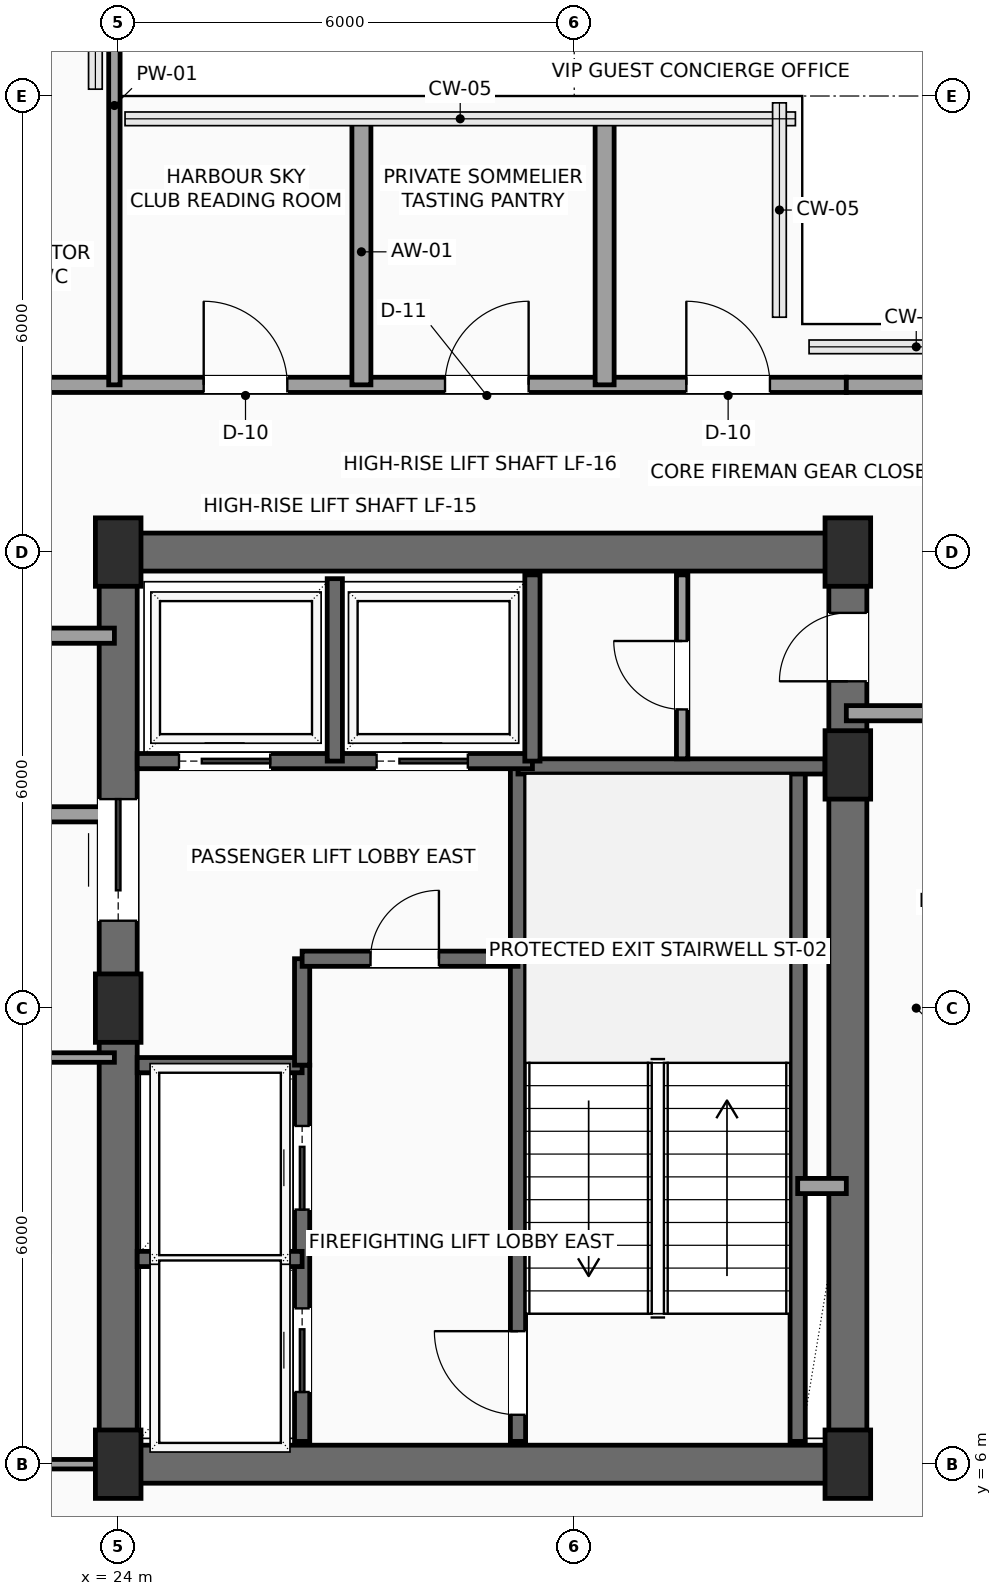
"""IFC4 building model, lengths in metres.
Left out: names, types, materials, properties, quantities, classifications, styles, units other than length and angle.
Written with IfcOpenShell. Run it as: python <this file> out.ifc"""

import sys

from ifc_helpers import new_model, si_unit, direction, frame, frame_2d, origin, origin_2d, place, context, subcontext, project, spatial, rectangle, extrude, element, fill, save


model = new_model("IFC4")
c1 = context("Model", 3, precision=1e-05, world=origin(), true_north=direction((0.0, 1.0)))
c2 = subcontext(c1, "Body", "Model", "MODEL_VIEW")
j1 = project(units=[si_unit("LENGTHUNIT", "METRE"), si_unit("PLANEANGLEUNIT", "RADIAN")], contexts=[c1])
p1 = place(None, origin())
s1 = spatial("IfcSite", under=j1, at=p1, CompositionType="ELEMENT")
p2 = place(p1, origin())
s2 = spatial("IfcBuilding", under=s1, at=p2, CompositionType="ELEMENT")
p3 = place(p2, frame((0.0, 0.0, 239.7)))
s3 = spatial("IfcBuildingStorey", under=s2, at=p3, CompositionType="ELEMENT", Elevation=239.7)
for number, where, z_axis, x_axis in (
    (1, (24.0, 6.0, 0.0), (0.0, 0.0, 1.0), (1.0, 0.0, 0.0)),
    (2, (24.0, 12.0, 0.0), (0.0, 0.0, 1.0), (1.0, 0.0, 0.0)),
    (3, (24.0, 18.0, 0.0), (0.0, 0.0, 1.0), (1.0, 0.0, 0.0)),
    (4, (33.6, 6.0, 0.0), (0.0, 0.0, 1.0), (1.0, 0.0, 0.0)),
    (5, (33.6, 15.2, 0.0), (0.0, 0.0, 1.0), (1.0, 0.0, 0.0)),
    (6, (33.6, 18.0, 0.0), (0.0, 0.0, 1.0), (1.0, 0.0, 0.0)),
):
    element("IfcColumn", number, at=place(p3, frame(where, z_axis=z_axis, x_axis=x_axis)), inside=s3, PredefinedType="COLUMN", context=c2, shape_type="SweptSolid", body=[
        extrude(rectangle(XDim=0.6, YDim=0.9, at=origin_2d()), origin(), (0.0, 0.0, 1.0), 3.5),
    ])
for number, where, z_axis, x_axis in (
    (7, (24.0, 6.0, 0.0), (0.0, 0.0, 1.0), (1.0, 0.0, 0.0)),
    (8, (24.0, 18.0, 0.0), (0.0, 0.0, 1.0), (1.0, 0.0, 0.0)),
):
    element("IfcWall", number, at=place(p3, frame(where, z_axis=z_axis, x_axis=x_axis)), inside=s3, PredefinedType="SHEAR", context=c2, shape_type="SweptSolid", body=[
        extrude(rectangle(XDim=9.6, YDim=0.5, at=frame_2d((4.8, 0.0))), origin(), (0.0, 0.0, 1.0), 3.3),
    ])
p4 = place(p3, frame((24.0, 6.0, 0.0), z_axis=(0.0, 0.0, 1.0), x_axis=(0.0, 1.0, 0.0)))
e9 = element("IfcWall", 9, at=p4, inside=s3, PredefinedType="SHEAR", context=c2, shape_type="SweptSolid", body=[
    extrude(rectangle(XDim=12.0, YDim=0.5, at=frame_2d((6.0, 0.0))), origin(), (0.0, 0.0, 1.0), 3.3),
])
p5 = place(p4, frame((7.15, 0.0, 0.0)))
e10 = element("IfcOpeningElement", 10, at=p5, cuts=e9, PredefinedType="OPENING", context=c2, shape_type="SweptSolid", body=[
    extrude(rectangle(XDim=1.6, YDim=2.3, at=frame_2d((0.8, 1.15))), frame((0.0, 0.26, 0.0), z_axis=(0.0, -1.0, 0.0), x_axis=(1.0, 0.0, 0.0)), (0.0, 0.0, 1.0), 0.52),
])
p6 = place(p3, frame((33.6, 6.0, 0.0), z_axis=(0.0, 0.0, 1.0), x_axis=(0.0, 1.0, 0.0)))
e11 = element("IfcWall", 11, at=p6, inside=s3, PredefinedType="SHEAR", context=c2, shape_type="SweptSolid", body=[
    extrude(rectangle(XDim=12.0, YDim=0.5, at=frame_2d((6.0, 0.0))), origin(), (0.0, 0.0, 1.0), 3.3),
])
p7 = place(p6, frame((10.3, 0.0, 0.0)))
e12 = element("IfcOpeningElement", 12, at=p7, cuts=e11, PredefinedType="OPENING", context=c2, shape_type="SweptSolid", body=[
    extrude(rectangle(XDim=0.9, YDim=2.15, at=frame_2d((0.45, 1.075))), frame((0.0, 0.26, 0.0), z_axis=(0.0, -1.0, 0.0), x_axis=(1.0, 0.0, 0.0)), (0.0, 0.0, 1.0), 0.52),
])
p8 = place(p3, frame((29.26, 6.3, 0.0), z_axis=(0.0, 0.0, 1.0), x_axis=(0.0, 1.0, 0.0)))
e13 = element("IfcWall", 13, at=p8, inside=s3, PredefinedType="SHEAR", context=c2, shape_type="SweptSolid", body=[
    extrude(rectangle(XDim=8.88, YDim=0.2, at=frame_2d((4.44, 0.0))), origin(), (0.0, 0.0, 1.0), 3.3),
])
p9 = place(p8, frame((0.35, 0.0, 0.0)))
e14 = element("IfcOpeningElement", 14, at=p9, cuts=e13, PredefinedType="OPENING", context=c2, shape_type="SweptSolid", body=[
    extrude(rectangle(XDim=1.1, YDim=2.2, at=frame_2d((0.55, 1.1))), frame((0.0, 0.11, 0.0), z_axis=(0.0, -1.0, 0.0), x_axis=(1.0, 0.0, 0.0)), (0.0, 0.0, 1.0), 0.22),
])
p10 = place(p3, frame((32.94, 6.3, 0.0), z_axis=(0.0, 0.0, 1.0), x_axis=(0.0, 1.0, 0.0)))
e15 = element("IfcWall", 15, at=p10, inside=s3, PredefinedType="SHEAR", context=c2, shape_type="SweptSolid", body=[
    extrude(rectangle(XDim=8.88, YDim=0.2, at=frame_2d((4.44, 0.0))), origin(), (0.0, 0.0, 1.0), 3.3),
])
p11 = place(p3, frame((29.26, 15.18, 0.0), z_axis=(0.0, 0.0, 1.0), x_axis=(1.0, 0.0, 0.0)))
e16 = element("IfcWall", 16, at=p11, inside=s3, PredefinedType="SHEAR", context=c2, shape_type="SweptSolid", body=[
    extrude(rectangle(XDim=4.04, YDim=0.2, at=frame_2d((2.02, 0.0))), origin(), (0.0, 0.0, 1.0), 3.3),
])
p12 = place(p3, frame((26.42, 6.3, 0.0), z_axis=(0.0, 0.0, 1.0), x_axis=(0.0, 1.0, 0.0)))
e17 = element("IfcWall", 17, at=p12, inside=s3, PredefinedType="SHEAR", context=c2, shape_type="SweptSolid", body=[
    extrude(rectangle(XDim=4.95, YDim=0.2, at=frame_2d((2.475, 0.0))), origin(), (0.0, 0.0, 1.0), 3.3),
])
p13 = place(p12, frame((0.65, 0.0, 0.0)))
e18 = element("IfcOpeningElement", 18, at=p13, cuts=e17, PredefinedType="OPENING", context=c2, shape_type="SweptSolid", body=[
    extrude(rectangle(XDim=1.1, YDim=2.2, at=frame_2d((0.55, 1.1))), frame((0.0, 0.11, 0.0), z_axis=(0.0, -1.0, 0.0), x_axis=(1.0, 0.0, 0.0)), (0.0, 0.0, 1.0), 0.22),
])
p14 = place(p12, frame((3.05, 0.0, 0.0)))
e19 = element("IfcOpeningElement", 19, at=p14, cuts=e17, PredefinedType="OPENING", context=c2, shape_type="SweptSolid", body=[
    extrude(rectangle(XDim=1.1, YDim=2.2, at=frame_2d((0.55, 1.1))), frame((0.0, 0.11, 0.0), z_axis=(0.0, -1.0, 0.0), x_axis=(1.0, 0.0, 0.0)), (0.0, 0.0, 1.0), 0.22),
])
for number, where, z_axis, x_axis in (
    (20, (24.25, 8.7, 0.0), (0.0, 0.0, 1.0), (1.0, 0.0, 0.0)),
    (21, (24.25, 11.25, 0.0), (0.0, 0.0, 1.0), (1.0, 0.0, 0.0)),
):
    element("IfcWall", number, at=place(p3, frame(where, z_axis=z_axis, x_axis=x_axis)), inside=s3, PredefinedType="SHEAR", context=c2, shape_type="SweptSolid", body=[
        extrude(rectangle(XDim=2.17, YDim=0.2, at=frame_2d((1.085, 0.0))), origin(), (0.0, 0.0, 1.0), 3.3),
    ])
p15 = place(p3, frame((26.42, 11.25, 0.0), z_axis=(0.0, 0.0, 1.0), x_axis=(0.0, 1.0, 0.0)))
e22 = element("IfcWall", 22, at=p15, inside=s3, PredefinedType="SHEAR", context=c2, shape_type="SweptSolid", body=[
    extrude(rectangle(XDim=1.4, YDim=0.2, at=frame_2d((0.7, 0.0))), origin(), (0.0, 0.0, 1.0), 3.3),
])
p16 = place(p3, frame((26.42, 12.65, 0.0), z_axis=(0.0, 0.0, 1.0), x_axis=(1.0, 0.0, 0.0)))
e23 = element("IfcWall", 23, at=p16, inside=s3, PredefinedType="SHEAR", context=c2, shape_type="SweptSolid", body=[
    extrude(rectangle(XDim=2.84, YDim=0.2, at=frame_2d((1.42, 0.0))), origin(), (0.0, 0.0, 1.0), 3.3),
])
p17 = place(p16, frame((0.9, 0.0, 0.0)))
e24 = element("IfcOpeningElement", 24, at=p17, cuts=e23, PredefinedType="OPENING", context=c2, shape_type="SweptSolid", body=[
    extrude(rectangle(XDim=0.9, YDim=2.15, at=frame_2d((0.45, 1.075))), frame((0.0, 0.11, 0.0), z_axis=(0.0, -1.0, 0.0), x_axis=(1.0, 0.0, 0.0)), (0.0, 0.0, 1.0), 0.22),
])
p18 = place(p3, frame((32.94, 9.66, 0.0), z_axis=(0.0, 0.0, 1.0), x_axis=(1.0, 0.0, 0.0)))
e25 = element("IfcWall", 25, at=p18, inside=s3, PredefinedType="SOLIDWALL", context=c2, shape_type="SweptSolid", body=[
    extrude(rectangle(XDim=0.64, YDim=0.2, at=frame_2d((0.32, 0.0))), origin(), (0.0, 0.0, 1.0), 3.3),
])
p19 = place(p3, frame((24.25, 15.25, 0.0), z_axis=(0.0, 0.0, 1.0), x_axis=(1.0, 0.0, 0.0)))
e26 = element("IfcWall", 26, at=p19, inside=s3, PredefinedType="SHEAR", context=c2, shape_type="SweptSolid", body=[
    extrude(rectangle(XDim=5.2, YDim=0.2, at=frame_2d((2.6, 0.0))), origin(), (0.0, 0.0, 1.0), 3.3),
])
p20 = place(p19, frame((0.55, 0.0, 0.0)))
e27 = element("IfcOpeningElement", 27, at=p20, cuts=e26, PredefinedType="OPENING", context=c2, shape_type="SweptSolid", body=[
    extrude(rectangle(XDim=1.2, YDim=2.2, at=frame_2d((0.6, 1.1))), frame((0.0, 0.11, 0.0), z_axis=(0.0, -1.0, 0.0), x_axis=(1.0, 0.0, 0.0)), (0.0, 0.0, 1.0), 0.22),
])
p21 = place(p19, frame((3.15, 0.0, 0.0)))
e28 = element("IfcOpeningElement", 28, at=p21, cuts=e26, PredefinedType="OPENING", context=c2, shape_type="SweptSolid", body=[
    extrude(rectangle(XDim=1.2, YDim=2.2, at=frame_2d((0.6, 1.1))), frame((0.0, 0.11, 0.0), z_axis=(0.0, -1.0, 0.0), x_axis=(1.0, 0.0, 0.0)), (0.0, 0.0, 1.0), 0.22),
])
p22 = place(p3, frame((26.85, 15.25, 0.0), z_axis=(0.0, 0.0, 1.0), x_axis=(0.0, 1.0, 0.0)))
e29 = element("IfcWall", 29, at=p22, inside=s3, PredefinedType="SHEAR", context=c2, shape_type="SweptSolid", body=[
    extrude(rectangle(XDim=2.4, YDim=0.2, at=frame_2d((1.2, 0.0))), origin(), (0.0, 0.0, 1.0), 3.3),
])
p23 = place(p3, frame((29.45, 15.25, 0.0), z_axis=(0.0, 0.0, 1.0), x_axis=(0.0, 1.0, 0.0)))
e30 = element("IfcWall", 30, at=p23, inside=s3, PredefinedType="SHEAR", context=c2, shape_type="SweptSolid", body=[
    extrude(rectangle(XDim=2.45, YDim=0.2, at=frame_2d((1.225, 0.0))), origin(), (0.0, 0.0, 1.0), 3.3),
])
p24 = place(p3, frame((31.42, 15.28, 0.0), z_axis=(0.0, 0.0, 1.0), x_axis=(0.0, 1.0, 0.0)))
e31 = element("IfcWall", 31, at=p24, inside=s3, PredefinedType="PARTITIONING", context=c2, shape_type="SweptSolid", body=[
    extrude(rectangle(XDim=2.42, YDim=0.15, at=frame_2d((1.21, 0.0))), origin(), (0.0, 0.0, 1.0), 3.3),
])
p25 = place(p24, frame((0.65, 0.0, 0.0)))
e32 = element("IfcOpeningElement", 32, at=p25, cuts=e31, PredefinedType="OPENING", context=c2, shape_type="SweptSolid", body=[
    extrude(rectangle(XDim=0.9, YDim=2.15, at=frame_2d((0.45, 1.075))), frame((0.0, 0.085, 0.0), z_axis=(0.0, -1.0, 0.0), x_axis=(1.0, 0.0, 0.0)), (0.0, 0.0, 1.0), 0.17),
])
p26 = place(p3, frame((20.45, 20.2, 0.0), z_axis=(0.0, 0.0, 1.0), x_axis=(1.0, 0.0, 0.0)))
e33 = element("IfcWall", 33, at=p26, inside=s3, PredefinedType="PARTITIONING", context=c2, shape_type="SweptSolid", body=[
    extrude(rectangle(XDim=13.13, YDim=0.2, at=frame_2d((6.565, 0.0))), origin(), (0.0, 0.0, 1.0), 3.3),
])
p27 = place(p26, frame((4.675, 0.0, 0.0)))
e34 = element("IfcOpeningElement", 34, at=p27, cuts=e33, PredefinedType="OPENING", context=c2, shape_type="SweptSolid", body=[
    extrude(rectangle(XDim=1.1, YDim=2.25, at=frame_2d((0.55, 1.125))), frame((0.0, 0.11, 0.0), z_axis=(0.0, -1.0, 0.0), x_axis=(1.0, 0.0, 0.0)), (0.0, 0.0, 1.0), 0.22),
])
p28 = place(p26, frame((7.85, 0.0, 0.0)))
e35 = element("IfcOpeningElement", 35, at=p28, cuts=e33, PredefinedType="OPENING", context=c2, shape_type="SweptSolid", body=[
    extrude(rectangle(XDim=1.1, YDim=2.25, at=frame_2d((0.55, 1.125))), frame((0.0, 0.11, 0.0), z_axis=(0.0, -1.0, 0.0), x_axis=(1.0, 0.0, 0.0)), (0.0, 0.0, 1.0), 0.22),
])
p29 = place(p26, frame((11.025, 0.0, 0.0)))
e36 = element("IfcOpeningElement", 36, at=p29, cuts=e33, PredefinedType="OPENING", context=c2, shape_type="SweptSolid", body=[
    extrude(rectangle(XDim=1.1, YDim=2.25, at=frame_2d((0.55, 1.125))), frame((0.0, 0.11, 0.0), z_axis=(0.0, -1.0, 0.0), x_axis=(1.0, 0.0, 0.0)), (0.0, 0.0, 1.0), 0.22),
])
for number, where, z_axis, x_axis in (
    (37, (33.58, 20.2, 0.0), (0.0, 0.0, 1.0), (1.0, 0.0, 0.0)),
    (38, (35.7, 15.88, 0.0), (0.0, 0.0, 1.0), (-1.0, 0.0, 0.0)),
):
    element("IfcWall", number, at=place(p3, frame(where, z_axis=z_axis, x_axis=x_axis)), inside=s3, PredefinedType="PARTITIONING", context=c2, shape_type="SweptSolid", body=[
        extrude(rectangle(XDim=2.12, YDim=0.2, at=frame_2d((1.06, 0.0))), origin(), (0.0, 0.0, 1.0), 3.3),
    ])
p30 = place(p3, frame((20.45, 16.9, 0.0), z_axis=(0.0, 0.0, 1.0), x_axis=(1.0, 0.0, 0.0)))
e39 = element("IfcWall", 39, at=p30, inside=s3, PredefinedType="PARTITIONING", context=c2, shape_type="SweptSolid", body=[
    extrude(rectangle(XDim=3.5, YDim=0.2, at=frame_2d((1.75, 0.0))), origin(), (0.0, 0.0, 1.0), 3.3),
])
p31 = place(p3, frame((23.95, 14.55, 0.0), z_axis=(0.0, 0.0, 1.0), x_axis=(-1.0, 0.0, 0.0)))
e40 = element("IfcWall", 40, at=p31, inside=s3, PredefinedType="PARTITIONING", context=c2, shape_type="SweptSolid", body=[
    extrude(rectangle(XDim=9.0, YDim=0.2, at=frame_2d((4.5, 0.0))), origin(), (0.0, 0.0, 1.0), 3.3),
])
p32 = place(p31, frame((6.925, 0.0, 0.0)))
e41 = element("IfcOpeningElement", 41, at=p32, cuts=e40, PredefinedType="OPENING", context=c2, shape_type="SweptSolid", body=[
    extrude(rectangle(XDim=1.0, YDim=2.2, at=frame_2d((0.5, 1.1))), frame((0.0, 0.11, 0.0), z_axis=(0.0, -1.0, 0.0), x_axis=(1.0, 0.0, 0.0)), (0.0, 0.0, 1.0), 0.22),
])
p33 = place(p3, frame((23.95, 20.2, 0.0), z_axis=(0.0, 0.0, 1.0), x_axis=(0.0, 1.0, 0.0)))
e42 = element("IfcWall", 42, at=p33, inside=s3, PredefinedType="PARTITIONING", context=c2, shape_type="SweptSolid", body=[
    extrude(rectangle(XDim=7.35, YDim=0.15, at=frame_2d((3.675, 0.0))), origin(), (0.0, 0.0, 1.0), 3.3),
])
for number, where, z_axis, x_axis in (
    (43, (27.2, 20.2, 0.0), (0.0, 0.0, 1.0), (0.0, 1.0, 0.0)),
    (44, (30.4, 20.2, 0.0), (0.0, 0.0, 1.0), (0.0, 1.0, 0.0)),
):
    element("IfcWall", number, at=place(p3, frame(where, z_axis=z_axis, x_axis=x_axis)), inside=s3, PredefinedType="PARTITIONING", context=c2, shape_type="SweptSolid", body=[
        extrude(rectangle(XDim=3.5, YDim=0.25, at=frame_2d((1.75, 0.0))), origin(), (0.0, 0.0, 1.0), 3.3),
    ])
p34 = place(p3, frame((18.0, 6.0, 0.0), z_axis=(0.0, 0.0, 1.0), x_axis=(1.0, 0.0, 0.0)))
e45 = element("IfcWall", 45, at=p34, inside=s3, PredefinedType="PARTITIONING", context=c2, shape_type="SweptSolid", body=[
    extrude(rectangle(XDim=5.95, YDim=0.125, at=frame_2d((2.975, 0.0))), origin(), (0.0, 0.0, 1.0), 2.992),
])
p35 = place(p3, frame((18.0, 11.35, 0.0), z_axis=(0.0, 0.0, 1.0), x_axis=(1.0, 0.0, 0.0)))
e46 = element("IfcWall", 46, at=p35, inside=s3, PredefinedType="PARTITIONING", context=c2, shape_type="SweptSolid", body=[
    extrude(rectangle(XDim=5.95, YDim=0.125, at=frame_2d((2.975, 0.0))), origin(), (0.0, 0.0, 1.0), 3.3),
])
p36 = place(p5, origin())
e47 = element("IfcDoor", 47, at=p36, inside=s3, OperationType="DOUBLE_DOOR_SLIDING", PredefinedType="DOOR", context=c2, shape_type="SweptSolid", body=[
    extrude(rectangle(XDim=1.6, YDim=2.3, at=frame_2d((0.8, 1.15))), frame((0.0, 0.025, 0.0), z_axis=(0.0, -1.0, 0.0), x_axis=(1.0, 0.0, 0.0)), (0.0, 0.0, 1.0), 0.05),
])
fill(e10, e47)
p37 = place(p7, origin())
e48 = element("IfcDoor", 48, at=p37, inside=s3, OperationType="SINGLE_SWING_LEFT", PredefinedType="DOOR", context=c2, shape_type="SweptSolid", body=[
    extrude(rectangle(XDim=0.9, YDim=2.15, at=frame_2d((0.45, 1.075))), frame((0.0, 0.025, 0.0), z_axis=(0.0, -1.0, 0.0), x_axis=(1.0, 0.0, 0.0)), (0.0, 0.0, 1.0), 0.05),
])
fill(e12, e48)
p38 = place(p9, origin())
e49 = element("IfcDoor", 49, at=p38, inside=s3, OperationType="SINGLE_SWING_RIGHT", PredefinedType="DOOR", context=c2, shape_type="SweptSolid", body=[
    extrude(rectangle(XDim=1.1, YDim=2.2, at=frame_2d((0.55, 1.1))), frame((0.0, 0.025, 0.0), z_axis=(0.0, -1.0, 0.0), x_axis=(1.0, 0.0, 0.0)), (0.0, 0.0, 1.0), 0.05),
])
fill(e14, e49)
p39 = place(p13, origin())
e50 = element("IfcDoor", 50, at=p39, inside=s3, OperationType="SLIDING_TO_LEFT", PredefinedType="DOOR", context=c2, shape_type="SweptSolid", body=[
    extrude(rectangle(XDim=1.1, YDim=2.2, at=frame_2d((0.55, 1.1))), frame((0.0, 0.025, 0.0), z_axis=(0.0, -1.0, 0.0), x_axis=(1.0, 0.0, 0.0)), (0.0, 0.0, 1.0), 0.05),
])
fill(e18, e50)
p40 = place(p14, origin())
e51 = element("IfcDoor", 51, at=p40, inside=s3, OperationType="SLIDING_TO_LEFT", PredefinedType="DOOR", context=c2, shape_type="SweptSolid", body=[
    extrude(rectangle(XDim=1.1, YDim=2.2, at=frame_2d((0.55, 1.1))), frame((0.0, 0.025, 0.0), z_axis=(0.0, -1.0, 0.0), x_axis=(1.0, 0.0, 0.0)), (0.0, 0.0, 1.0), 0.05),
])
fill(e19, e51)
p41 = place(p17, origin())
e52 = element("IfcDoor", 52, at=p41, inside=s3, OperationType="SINGLE_SWING_RIGHT", PredefinedType="DOOR", context=c2, shape_type="SweptSolid", body=[
    extrude(rectangle(XDim=0.9, YDim=2.15, at=frame_2d((0.45, 1.075))), frame((0.0, 0.025, 0.0), z_axis=(0.0, -1.0, 0.0), x_axis=(1.0, 0.0, 0.0)), (0.0, 0.0, 1.0), 0.05),
])
fill(e24, e52)
p42 = place(p20, origin())
e53 = element("IfcDoor", 53, at=p42, inside=s3, OperationType="SLIDING_TO_RIGHT", PredefinedType="DOOR", context=c2, shape_type="SweptSolid", body=[
    extrude(rectangle(XDim=1.2, YDim=2.2, at=frame_2d((0.6, 1.1))), frame((0.0, 0.025, 0.0), z_axis=(0.0, -1.0, 0.0), x_axis=(1.0, 0.0, 0.0)), (0.0, 0.0, 1.0), 0.05),
])
fill(e27, e53)
p43 = place(p21, origin())
e54 = element("IfcDoor", 54, at=p43, inside=s3, OperationType="SLIDING_TO_RIGHT", PredefinedType="DOOR", context=c2, shape_type="SweptSolid", body=[
    extrude(rectangle(XDim=1.2, YDim=2.2, at=frame_2d((0.6, 1.1))), frame((0.0, 0.025, 0.0), z_axis=(0.0, -1.0, 0.0), x_axis=(1.0, 0.0, 0.0)), (0.0, 0.0, 1.0), 0.05),
])
fill(e28, e54)
p44 = place(p25, origin())
e55 = element("IfcDoor", 55, at=p44, inside=s3, OperationType="SINGLE_SWING_RIGHT", PredefinedType="DOOR", context=c2, shape_type="SweptSolid", body=[
    extrude(rectangle(XDim=0.9, YDim=2.15, at=frame_2d((0.45, 1.075))), frame((0.0, 0.025, 0.0), z_axis=(0.0, -1.0, 0.0), x_axis=(1.0, 0.0, 0.0)), (0.0, 0.0, 1.0), 0.05),
])
fill(e32, e55)
p45 = place(p27, origin())
e56 = element("IfcDoor", 56, at=p45, inside=s3, OperationType="SINGLE_SWING_LEFT", PredefinedType="DOOR", context=c2, shape_type="SweptSolid", body=[
    extrude(rectangle(XDim=1.1, YDim=2.25, at=frame_2d((0.55, 1.125))), frame((0.0, 0.025, 0.0), z_axis=(0.0, -1.0, 0.0), x_axis=(1.0, 0.0, 0.0)), (0.0, 0.0, 1.0), 0.05),
])
fill(e34, e56)
p46 = place(p28, origin())
e57 = element("IfcDoor", 57, at=p46, inside=s3, OperationType="SINGLE_SWING_RIGHT", PredefinedType="DOOR", context=c2, shape_type="SweptSolid", body=[
    extrude(rectangle(XDim=1.1, YDim=2.25, at=frame_2d((0.55, 1.125))), frame((0.0, 0.025, 0.0), z_axis=(0.0, -1.0, 0.0), x_axis=(1.0, 0.0, 0.0)), (0.0, 0.0, 1.0), 0.05),
])
fill(e35, e57)
p47 = place(p29, origin())
e58 = element("IfcDoor", 58, at=p47, inside=s3, OperationType="SINGLE_SWING_LEFT", PredefinedType="DOOR", context=c2, shape_type="SweptSolid", body=[
    extrude(rectangle(XDim=1.1, YDim=2.25, at=frame_2d((0.55, 1.125))), frame((0.0, 0.025, 0.0), z_axis=(0.0, -1.0, 0.0), x_axis=(1.0, 0.0, 0.0)), (0.0, 0.0, 1.0), 0.05),
])
fill(e36, e58)
save(model, sys.argv[1])
